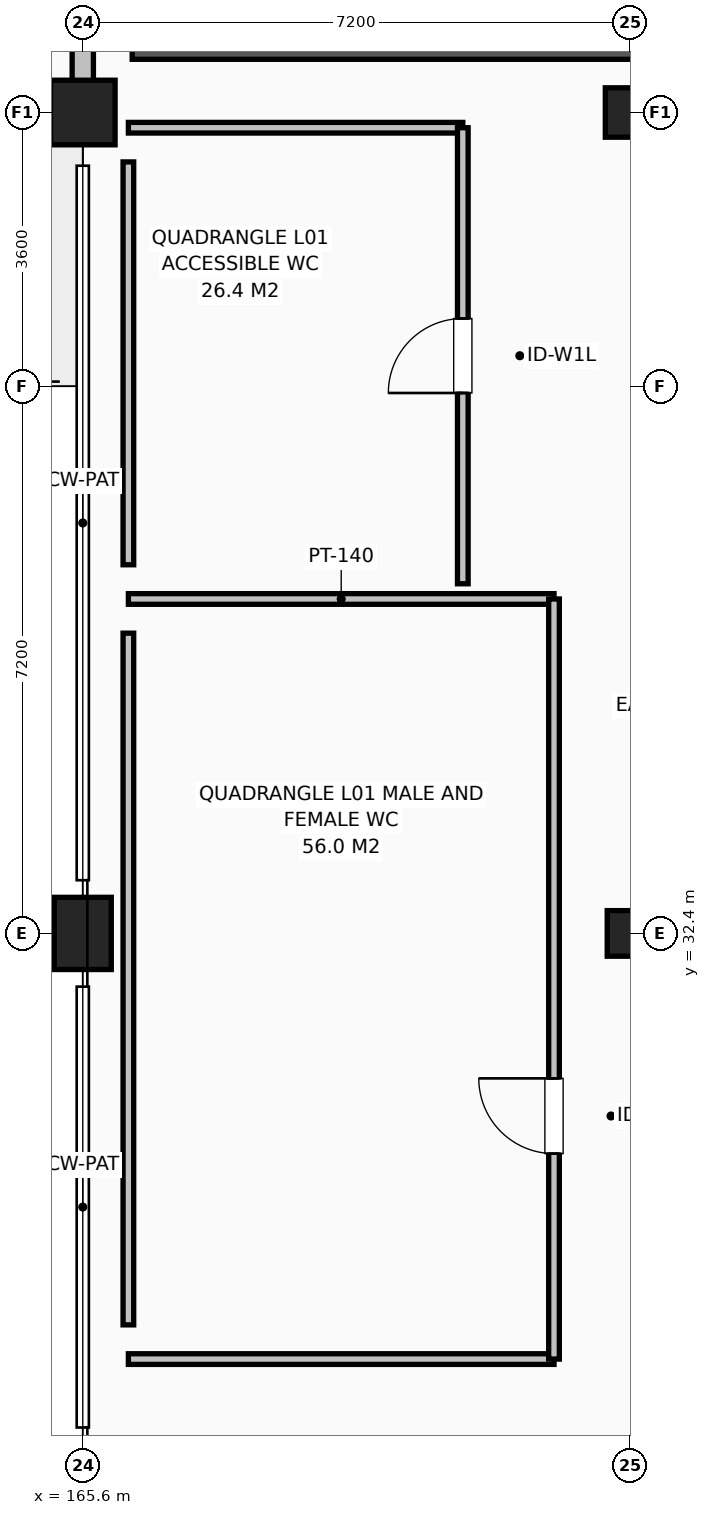
"""IFC4 building model, lengths in metres.
Left out: names, types, materials, properties, quantities, classifications, styles, units other than length and angle.
Written with IfcOpenShell. Run it as: python <this file> out.ifc"""

import sys

from ifc_helpers import new_model, si_unit, direction, frame, frame_2d, origin, origin_2d, place, context, subcontext, project, spatial, rectangle, extrude, element, fill, save


model = new_model("IFC4")
c1 = context("Model", 3, precision=1e-05, world=origin(), true_north=direction((0.0, 1.0)))
c2 = subcontext(c1, "Body", "Model", "MODEL_VIEW")
j1 = project(units=[si_unit("LENGTHUNIT", "METRE"), si_unit("PLANEANGLEUNIT", "RADIAN")], contexts=[c1])
p1 = place(None, origin())
s1 = spatial("IfcSite", under=j1, at=p1, CompositionType="ELEMENT")
p2 = place(p1, origin())
s2 = spatial("IfcBuilding", under=s1, at=p2, CompositionType="ELEMENT")
p3 = place(p2, frame((0.0, 0.0, 4.8)))
s3 = spatial("IfcBuildingStorey", under=s2, at=p3, CompositionType="ELEMENT", Elevation=4.8)
p4 = place(p3, frame((165.6, 32.4, 0.0), z_axis=(0.0, 0.0, 1.0), x_axis=(1.0, 0.0, 0.0)))
e1 = element("IfcColumn", 1, at=p4, inside=s3, PredefinedType="COLUMN", context=c2, shape_type="SweptSolid", body=[
    extrude(rectangle(XDim=0.75, YDim=0.95, at=origin_2d()), origin(), (0.0, 0.0, 1.0), 4.2),
])
p5 = place(p3, frame((165.6, 43.2, 0.0), z_axis=(0.0, 0.0, 1.0), x_axis=(1.0, 0.0, 0.0)))
e2 = element("IfcColumn", 2, at=p5, inside=s3, PredefinedType="COLUMN", context=c2, shape_type="SweptSolid", body=[
    extrude(rectangle(XDim=0.85, YDim=0.85, at=origin_2d()), origin(), (0.0, 0.0, 1.0), 4.2),
])
p6 = place(p3, frame((172.8, 32.4, 0.0), z_axis=(0.0, 0.0, 1.0), x_axis=(1.0, 0.0, 0.0)))
e3 = element("IfcColumn", 3, at=p6, inside=s3, PredefinedType="COLUMN", context=c2, shape_type="SweptSolid", body=[
    extrude(rectangle(XDim=0.6, YDim=0.6, at=origin_2d()), origin(), (0.0, 0.0, 1.0), 4.2),
])
p7 = place(p3, frame((172.8, 43.2, 0.0), z_axis=(0.0, 0.0, 1.0), x_axis=(1.0, 0.0, 0.0)))
e4 = element("IfcColumn", 4, at=p7, inside=s3, PredefinedType="COLUMN", context=c2, shape_type="SweptSolid", body=[
    extrude(rectangle(XDim=0.65, YDim=0.65, at=origin_2d()), origin(), (0.0, 0.0, 1.0), 4.2),
])
p8 = place(p3, frame((165.6, 86.4, 0.0), z_axis=(0.0, 0.0, 1.0), x_axis=(0.0, -1.0, 0.0)))
e5 = element("IfcWall", 5, at=p8, inside=s3, PredefinedType="SOLIDWALL", context=c2, shape_type="SweptSolid", body=[
    extrude(rectangle(XDim=43.2, YDim=0.28, at=frame_2d((21.6, 0.0))), origin(), (0.0, 0.0, 1.0), 3.5),
])
p9 = place(p8, frame((9.4, 0.0, 0.78)))
e6 = element("IfcOpeningElement", 6, at=p9, cuts=e5, PredefinedType="OPENING", context=c2, shape_type="SweptSolid", body=[
    extrude(rectangle(XDim=1.25, YDim=1.7, at=frame_2d((0.625, 0.85))), frame((0.0, 0.15, 0.0), z_axis=(0.0, -1.0, 0.0), x_axis=(1.0, 0.0, 0.0)), (0.0, 0.0, 1.0), 0.3),
])
p10 = place(p8, frame((16.6, 0.0, 0.78)))
e7 = element("IfcOpeningElement", 7, at=p10, cuts=e5, PredefinedType="OPENING", context=c2, shape_type="SweptSolid", body=[
    extrude(rectangle(XDim=1.35, YDim=1.75, at=frame_2d((0.675, 0.875))), frame((0.0, 0.15, 0.0), z_axis=(0.0, -1.0, 0.0), x_axis=(1.0, 0.0, 0.0)), (0.0, 0.0, 1.0), 0.3),
])
p11 = place(p8, frame((23.8, 0.0, 0.78)))
e8 = element("IfcOpeningElement", 8, at=p11, cuts=e5, PredefinedType="OPENING", context=c2, shape_type="SweptSolid", body=[
    extrude(rectangle(XDim=1.5, YDim=1.75, at=frame_2d((0.75, 0.875))), frame((0.0, 0.15, 0.0), z_axis=(0.0, -1.0, 0.0), x_axis=(1.0, 0.0, 0.0)), (0.0, 0.0, 1.0), 0.3),
])
p12 = place(p3, frame((166.25, 44.05, 0.0), z_axis=(0.0, 0.0, 1.0), x_axis=(1.0, 0.0, 0.0)))
e9 = element("IfcWall", 9, at=p12, inside=s3, PredefinedType="SHEAR", context=c2, shape_type="SweptSolid", body=[
    extrude(rectangle(XDim=7.1, YDim=0.3, at=frame_2d((3.55, 0.0))), origin(), (0.0, 0.0, 1.0), 3.925),
])
for number, where, z_axis, x_axis in (
    (10, (166.2, 36.8, 0.0), (0.0, 0.0, 1.0), (1.0, 0.0, 0.0)),
    (11, (171.8, 26.8, 0.0), (0.0, 0.0, 1.0), (-1.0, 0.0, 0.0)),
):
    element("IfcWall", number, at=place(p3, frame(where, z_axis=z_axis, x_axis=x_axis)), inside=s3, PredefinedType="PARTITIONING", context=c2, shape_type="SweptSolid", body=[
        extrude(rectangle(XDim=5.6, YDim=0.14, at=frame_2d((2.8, 0.0))), origin(), (0.0, 0.0, 1.0), 3.5),
    ])
p13 = place(p3, frame((166.2, 36.35, 0.0), z_axis=(0.0, 0.0, 1.0), x_axis=(0.0, -1.0, 0.0)))
e12 = element("IfcWall", 12, at=p13, inside=s3, PredefinedType="PARTITIONING", context=c2, shape_type="SweptSolid", body=[
    extrude(rectangle(XDim=9.1, YDim=0.14, at=frame_2d((4.55, 0.0))), origin(), (0.0, 0.0, 1.0), 3.5),
])
p14 = place(p3, frame((171.8, 26.8, 0.0), z_axis=(0.0, 0.0, 1.0), x_axis=(0.0, 1.0, 0.0)))
e13 = element("IfcWall", 13, at=p14, inside=s3, PredefinedType="PARTITIONING", context=c2, shape_type="SweptSolid", body=[
    extrude(rectangle(XDim=10.0, YDim=0.14, at=frame_2d((5.0, 0.0))), origin(), (0.0, 0.0, 1.0), 3.5),
])
p15 = place(p14, frame((2.703, 0.0, 0.0)))
e14 = element("IfcOpeningElement", 14, at=p15, cuts=e13, PredefinedType="OPENING", context=c2, shape_type="SweptSolid", body=[
    extrude(rectangle(XDim=0.99, YDim=2.15, at=frame_2d((0.495, 1.075))), frame((0.0, 0.08, 0.0), z_axis=(0.0, -1.0, 0.0), x_axis=(1.0, 0.0, 0.0)), (0.0, 0.0, 1.0), 0.16),
])
p16 = place(p3, frame((166.2, 43.0, 0.0), z_axis=(0.0, 0.0, 1.0), x_axis=(1.0, 0.0, 0.0)))
e15 = element("IfcWall", 15, at=p16, inside=s3, PredefinedType="PARTITIONING", context=c2, shape_type="SweptSolid", body=[
    extrude(rectangle(XDim=4.4, YDim=0.14, at=frame_2d((2.2, 0.0))), origin(), (0.0, 0.0, 1.0), 3.107),
])
p17 = place(p3, frame((166.2, 42.55, 0.0), z_axis=(0.0, 0.0, 1.0), x_axis=(0.0, -1.0, 0.0)))
e16 = element("IfcWall", 16, at=p17, inside=s3, PredefinedType="PARTITIONING", context=c2, shape_type="SweptSolid", body=[
    extrude(rectangle(XDim=5.3, YDim=0.14, at=frame_2d((2.65, 0.0))), origin(), (0.0, 0.0, 1.0), 3.5),
])
p18 = place(p3, frame((170.6, 37.0, 0.0), z_axis=(0.0, 0.0, 1.0), x_axis=(0.0, 1.0, 0.0)))
e17 = element("IfcWall", 17, at=p18, inside=s3, PredefinedType="PARTITIONING", context=c2, shape_type="SweptSolid", body=[
    extrude(rectangle(XDim=6.0, YDim=0.14, at=frame_2d((3.0, 0.0))), origin(), (0.0, 0.0, 1.0), 3.107),
])
p19 = place(p18, frame((2.51, 0.0, 0.0)))
e18 = element("IfcOpeningElement", 18, at=p19, cuts=e17, PredefinedType="OPENING", context=c2, shape_type="SweptSolid", body=[
    extrude(rectangle(XDim=0.98, YDim=2.15, at=frame_2d((0.49, 1.075))), frame((0.0, 0.08, 0.0), z_axis=(0.0, -1.0, 0.0), x_axis=(1.0, 0.0, 0.0)), (0.0, 0.0, 1.0), 0.16),
])
p20 = place(p15, origin())
e19 = element("IfcDoor", 19, at=p20, inside=s3, OperationType="SINGLE_SWING_RIGHT", PredefinedType="DOOR", context=c2, shape_type="SweptSolid", body=[
    extrude(rectangle(XDim=0.99, YDim=2.15, at=frame_2d((0.495, 1.075))), frame((0.0, 0.025, 0.0), z_axis=(0.0, -1.0, 0.0), x_axis=(1.0, 0.0, 0.0)), (0.0, 0.0, 1.0), 0.05),
])
fill(e14, e19)
p21 = place(p19, origin())
e20 = element("IfcDoor", 20, at=p21, inside=s3, OperationType="SINGLE_SWING_LEFT", PredefinedType="DOOR", context=c2, shape_type="SweptSolid", body=[
    extrude(rectangle(XDim=0.98, YDim=2.15, at=frame_2d((0.49, 1.075))), frame((0.0, 0.025, 0.0), z_axis=(0.0, -1.0, 0.0), x_axis=(1.0, 0.0, 0.0)), (0.0, 0.0, 1.0), 0.05),
])
fill(e18, e20)
save(model, sys.argv[1])
